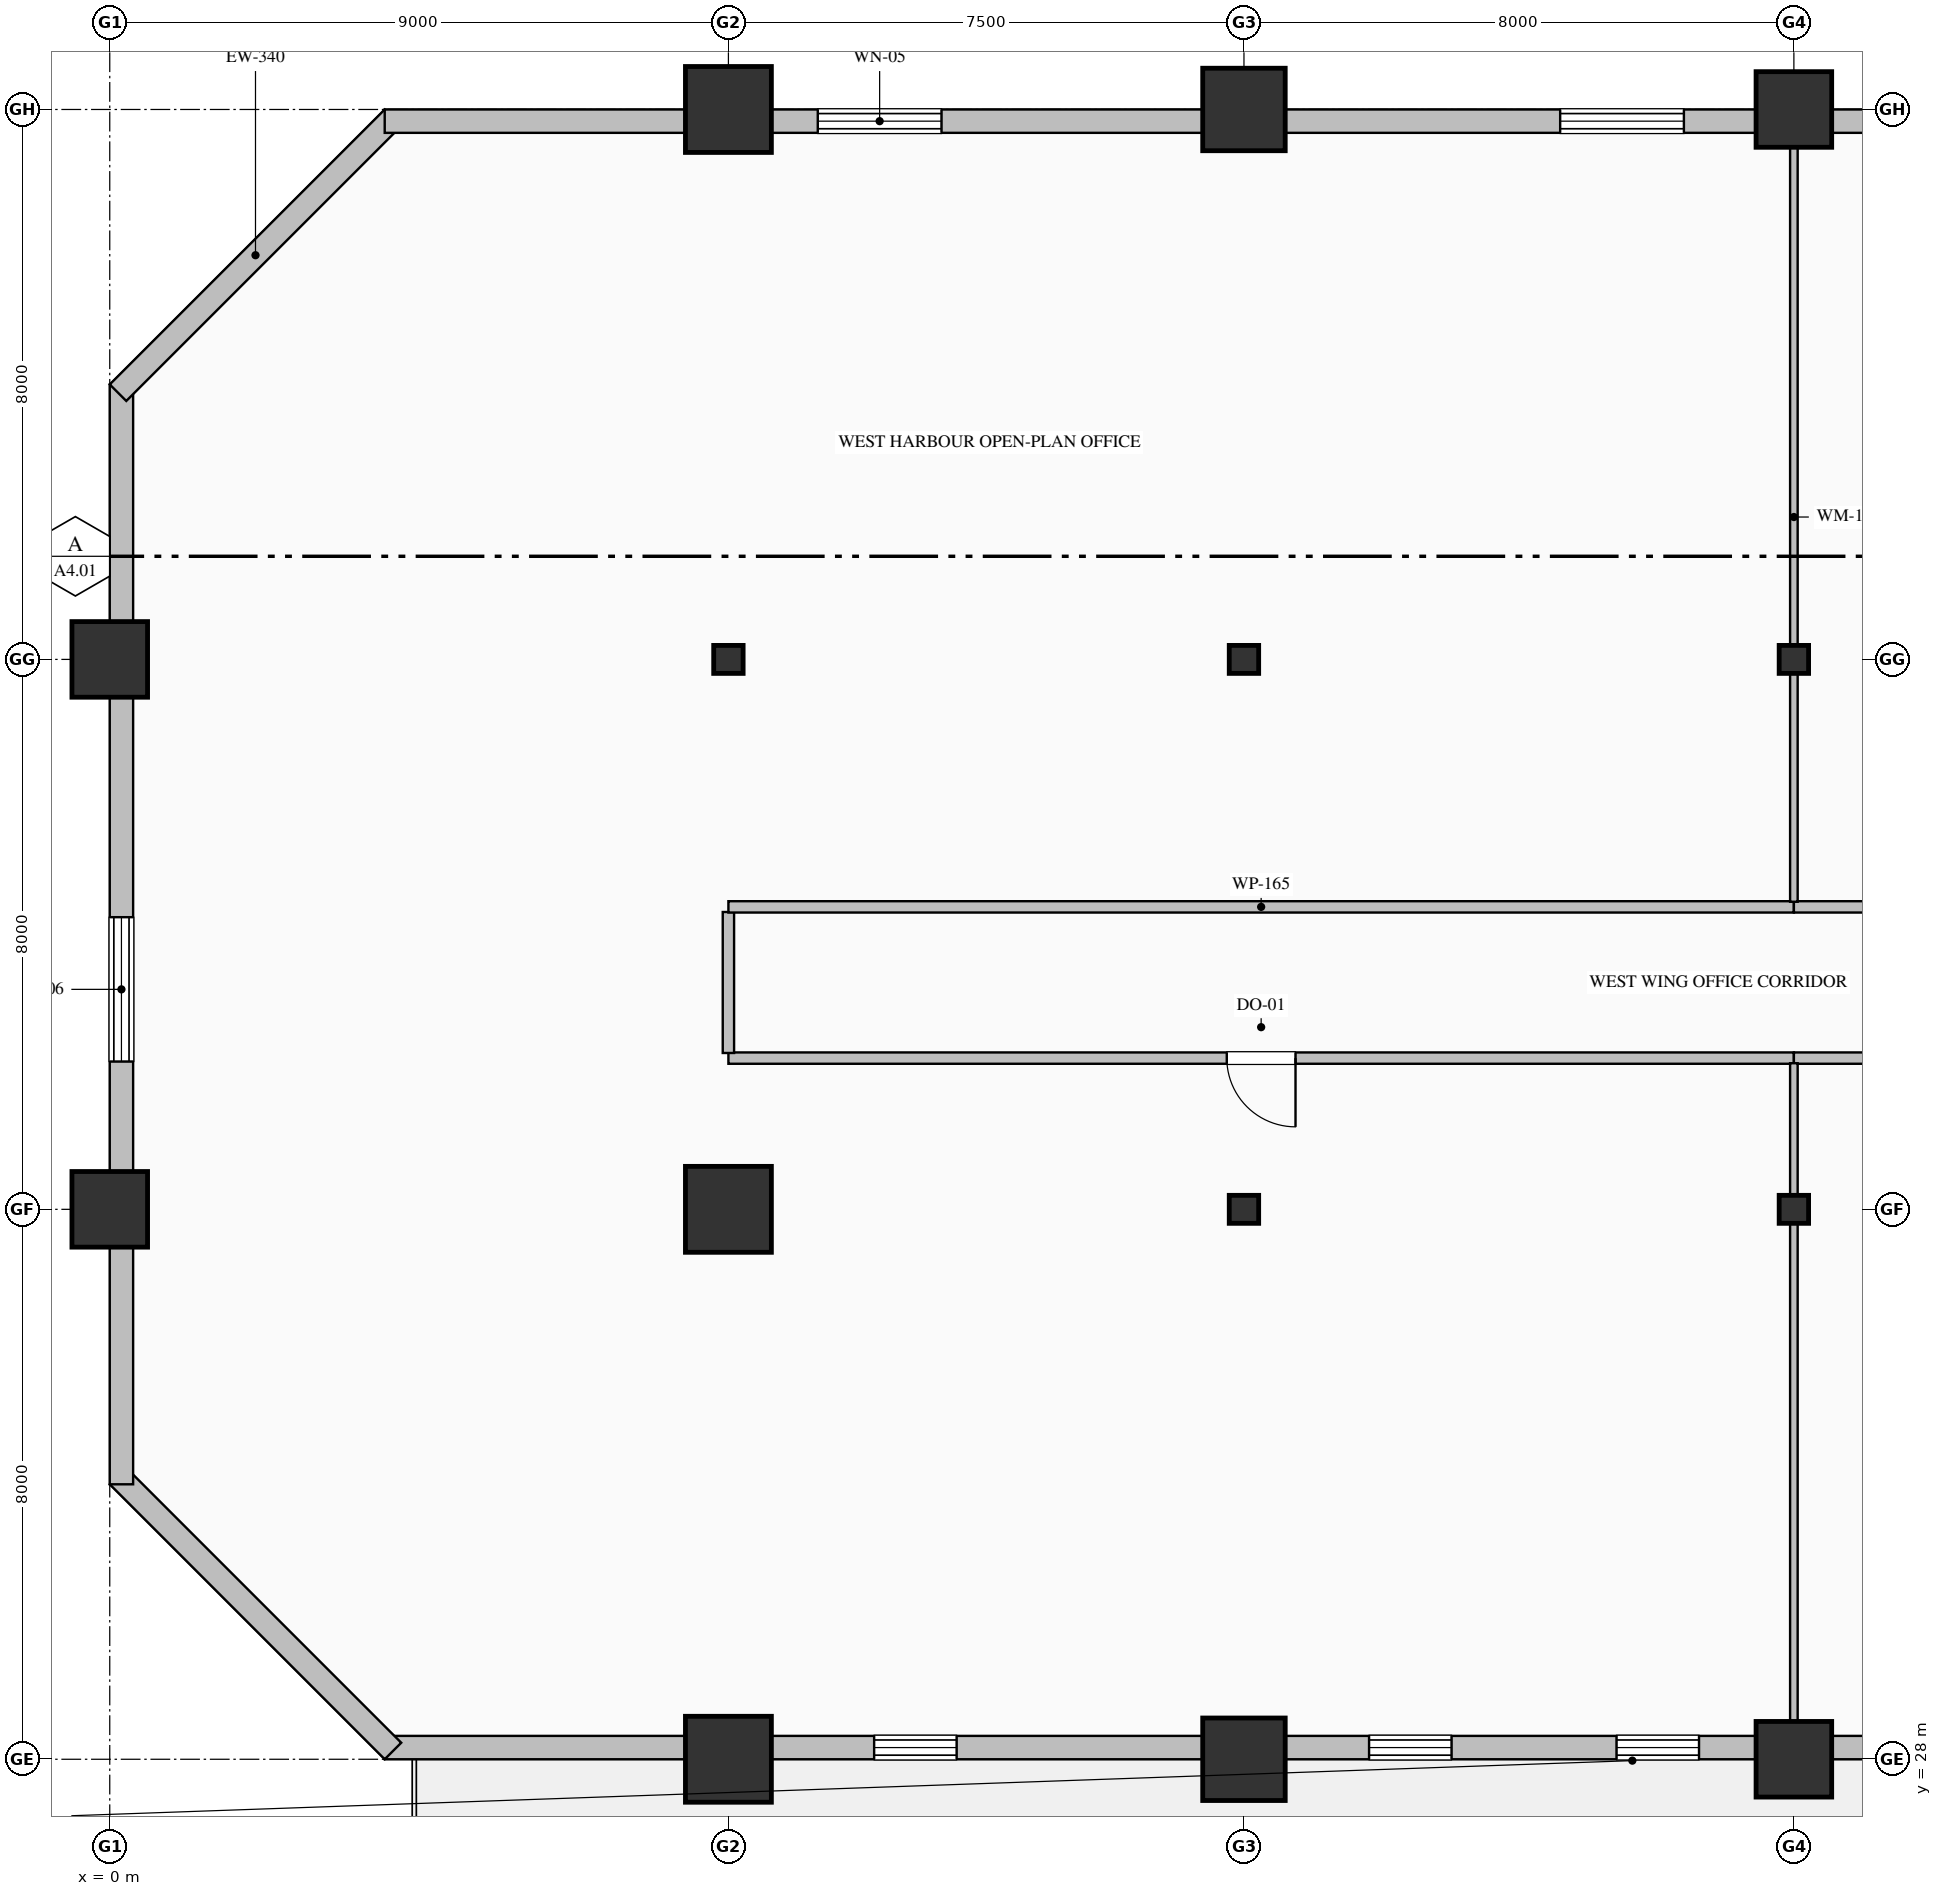
"""IFC4 building model, lengths in metres.
Left out: names, types, materials, properties, quantities, classifications, styles, units other than length and angle.
Written with IfcOpenShell. Run it as: python <this file> out.ifc"""

import sys

from ifc_helpers import new_model, si_unit, direction, frame, frame_2d, origin, origin_2d, place, context, subcontext, project, spatial, rectangle, hollow_rectangle, hollow_circle, i_section, extrude, element, fill, save


model = new_model("IFC4")
c1 = context("Model", 3, precision=1e-05, world=origin(), true_north=direction((0.0, 1.0)))
c2 = subcontext(c1, "Body", "Model", "MODEL_VIEW")
j1 = project(units=[si_unit("LENGTHUNIT", "METRE"), si_unit("PLANEANGLEUNIT", "RADIAN")], contexts=[c1])
p1 = place(None, origin())
s1 = spatial("IfcSite", under=j1, at=p1, CompositionType="ELEMENT")
p2 = place(p1, origin())
s2 = spatial("IfcBuilding", under=s1, at=p2, CompositionType="ELEMENT")
p3 = place(p2, frame((0.0, 0.0, 64.2)))
s3 = spatial("IfcBuildingStorey", under=s2, at=p3, CompositionType="ELEMENT", Elevation=64.2)
for number, where, z_axis, x_axis in (
    (1, (0.0, 36.0, 0.0), (0.0, 0.0, 1.0), (1.0, 0.0, 0.0)),
    (2, (0.0, 44.0, 0.0), (0.0, 0.0, 1.0), (1.0, 0.0, 0.0)),
):
    element("IfcColumn", number, at=place(p3, frame(where, z_axis=z_axis, x_axis=x_axis)), inside=s3, PredefinedType="COLUMN", context=c2, shape_type="SweptSolid", body=[
        extrude(hollow_rectangle(XDim=1.1, YDim=1.1, WallThickness=0.04, at=origin_2d()), origin(), (0.0, 0.0, 1.0), 4.0),
    ])
for number, where, z_axis, x_axis in (
    (3, (9.0, 28.0, 0.0), (0.0, 0.0, 1.0), (1.0, 0.0, 0.0)),
    (4, (9.0, 36.0, 0.0), (0.0, 0.0, 1.0), (1.0, 0.0, 0.0)),
):
    element("IfcColumn", number, at=place(p3, frame(where, z_axis=z_axis, x_axis=x_axis)), inside=s3, PredefinedType="COLUMN", context=c2, shape_type="SweptSolid", body=[
        extrude(hollow_rectangle(XDim=1.25, YDim=1.25, WallThickness=0.045, at=origin_2d()), origin(), (0.0, 0.0, 1.0), 4.0),
    ])
p4 = place(p3, frame((9.0, 44.0, 0.0), z_axis=(0.0, 0.0, 1.0), x_axis=(1.0, 0.0, 0.0)))
e5 = element("IfcColumn", 5, at=p4, inside=s3, PredefinedType="COLUMN", context=c2, shape_type="SweptSolid", body=[
    extrude(i_section(OverallWidth=0.407, OverallDepth=0.428, WebThickness=0.02, FlangeThickness=0.035, FilletRadius=0.022, at=origin_2d()), origin(), (0.0, 0.0, 1.0), 4.0),
])
p5 = place(p3, frame((9.0, 52.0, 0.0), z_axis=(0.0, 0.0, 1.0), x_axis=(1.0, 0.0, 0.0)))
e6 = element("IfcColumn", 6, at=p5, inside=s3, PredefinedType="COLUMN", context=c2, shape_type="SweptSolid", body=[
    extrude(hollow_rectangle(XDim=1.25, YDim=1.25, WallThickness=0.045, at=origin_2d()), origin(), (0.0, 0.0, 1.0), 4.0),
])
p6 = place(p3, frame((16.5, 28.0, 0.0), z_axis=(0.0, 0.0, 1.0), x_axis=(1.0, 0.0, 0.0)))
e7 = element("IfcColumn", 7, at=p6, inside=s3, PredefinedType="COLUMN", context=c2, shape_type="SweptSolid", body=[
    extrude(hollow_circle(Radius=0.6, WallThickness=0.04, at=origin_2d()), origin(), (0.0, 0.0, 1.0), 4.0),
])
for number, where, z_axis, x_axis in (
    (8, (16.5, 36.0, 0.0), (0.0, 0.0, 1.0), (1.0, 0.0, 0.0)),
    (9, (16.5, 44.0, 0.0), (0.0, 0.0, 1.0), (1.0, 0.0, 0.0)),
):
    element("IfcColumn", number, at=place(p3, frame(where, z_axis=z_axis, x_axis=x_axis)), inside=s3, PredefinedType="COLUMN", context=c2, shape_type="SweptSolid", body=[
        extrude(i_section(OverallWidth=0.407, OverallDepth=0.428, WebThickness=0.02, FlangeThickness=0.035, FilletRadius=0.022, at=origin_2d()), origin(), (0.0, 0.0, 1.0), 4.0),
    ])
p7 = place(p3, frame((16.5, 52.0, 0.0), z_axis=(0.0, 0.0, 1.0), x_axis=(1.0, 0.0, 0.0)))
e10 = element("IfcColumn", 10, at=p7, inside=s3, PredefinedType="COLUMN", context=c2, shape_type="SweptSolid", body=[
    extrude(hollow_circle(Radius=0.6, WallThickness=0.04, at=origin_2d()), origin(), (0.0, 0.0, 1.0), 4.0),
])
p8 = place(p3, frame((24.5, 28.0, 0.0), z_axis=(0.0, 0.0, 1.0), x_axis=(1.0, 0.0, 0.0)))
e11 = element("IfcColumn", 11, at=p8, inside=s3, PredefinedType="COLUMN", context=c2, shape_type="SweptSolid", body=[
    extrude(hollow_rectangle(XDim=1.1, YDim=1.1, WallThickness=0.04, at=origin_2d()), origin(), (0.0, 0.0, 1.0), 4.0),
])
for number, where, z_axis, x_axis in (
    (12, (24.5, 36.0, 0.0), (0.0, 0.0, 1.0), (1.0, 0.0, 0.0)),
    (13, (24.5, 44.0, 0.0), (0.0, 0.0, 1.0), (1.0, 0.0, 0.0)),
):
    element("IfcColumn", number, at=place(p3, frame(where, z_axis=z_axis, x_axis=x_axis)), inside=s3, PredefinedType="COLUMN", context=c2, shape_type="SweptSolid", body=[
        extrude(i_section(OverallWidth=0.407, OverallDepth=0.428, WebThickness=0.02, FlangeThickness=0.035, FilletRadius=0.022, at=origin_2d()), origin(), (0.0, 0.0, 1.0), 4.0),
    ])
p9 = place(p3, frame((24.5, 52.0, 0.0), z_axis=(0.0, 0.0, 1.0), x_axis=(1.0, 0.0, 0.0)))
e14 = element("IfcColumn", 14, at=p9, inside=s3, PredefinedType="COLUMN", context=c2, shape_type="SweptSolid", body=[
    extrude(hollow_rectangle(XDim=1.1, YDim=1.1, WallThickness=0.04, at=origin_2d()), origin(), (0.0, 0.0, 1.0), 4.0),
])
p10 = place(p3, frame((40.52, 28.17, 0.0), z_axis=(0.0, 0.0, 1.0), x_axis=(-1.0, 0.0, 0.0)))
e15 = element("IfcWall", 15, at=p10, inside=s3, PredefinedType="SOLIDWALL", context=c2, shape_type="SweptSolid", body=[
    extrude(rectangle(XDim=36.52, YDim=0.34, at=frame_2d((18.26, 0.0))), origin(), (0.0, 0.0, 1.0), 3.05),
])
p11 = place(p10, frame((13.8, 0.0, 0.7)))
e16 = element("IfcOpeningElement", 16, at=p11, cuts=e15, PredefinedType="OPENING", context=c2, shape_type="SweptSolid", body=[
    extrude(rectangle(XDim=1.2, YDim=1.85, at=frame_2d((0.6, 0.925))), frame((0.0, 0.18, 0.0), z_axis=(0.0, -1.0, 0.0), x_axis=(1.0, 0.0, 0.0)), (0.0, 0.0, 1.0), 0.36),
])
p12 = place(p10, frame((17.4, 0.0, 0.7)))
e17 = element("IfcOpeningElement", 17, at=p12, cuts=e15, PredefinedType="OPENING", context=c2, shape_type="SweptSolid", body=[
    extrude(rectangle(XDim=1.2, YDim=1.85, at=frame_2d((0.6, 0.925))), frame((0.0, 0.18, 0.0), z_axis=(0.0, -1.0, 0.0), x_axis=(1.0, 0.0, 0.0)), (0.0, 0.0, 1.0), 0.36),
])
p13 = place(p10, frame((21.0, 0.0, 0.7)))
e18 = element("IfcOpeningElement", 18, at=p13, cuts=e15, PredefinedType="OPENING", context=c2, shape_type="SweptSolid", body=[
    extrude(rectangle(XDim=1.2, YDim=1.85, at=frame_2d((0.6, 0.925))), frame((0.0, 0.18, 0.0), z_axis=(0.0, -1.0, 0.0), x_axis=(1.0, 0.0, 0.0)), (0.0, 0.0, 1.0), 0.36),
])
p14 = place(p10, frame((28.2, 0.0, 0.7)))
e19 = element("IfcOpeningElement", 19, at=p14, cuts=e15, PredefinedType="OPENING", context=c2, shape_type="SweptSolid", body=[
    extrude(rectangle(XDim=1.2, YDim=1.85, at=frame_2d((0.6, 0.925))), frame((0.0, 0.18, 0.0), z_axis=(0.0, -1.0, 0.0), x_axis=(1.0, 0.0, 0.0)), (0.0, 0.0, 1.0), 0.36),
])
p15 = place(p10, frame((11.395, 0.0, 0.0)))
e20 = element("IfcOpeningElement", 20, at=p15, cuts=e15, PredefinedType="OPENING", context=c2, shape_type="SweptSolid", body=[
    extrude(rectangle(XDim=1.25, YDim=2.25, at=frame_2d((0.625, 1.125))), frame((0.0, 0.18, 0.0), z_axis=(0.0, -1.0, 0.0), x_axis=(1.0, 0.0, 0.0)), (0.0, 0.0, 1.0), 0.36),
])
p16 = place(p3, frame((4.12, 28.12, 0.0), z_axis=(0.0, 0.0, 1.0), x_axis=(-0.707106781187, 0.707106781187, 0.0)))
e21 = element("IfcWall", 21, at=p16, inside=s3, PredefinedType="SOLIDWALL", context=c2, shape_type="SweptSolid", body=[
    extrude(rectangle(XDim=5.657, YDim=0.34, at=frame_2d((2.828, 0.0))), origin(), (0.0, 0.0, 1.0), 3.75),
])
p17 = place(p3, frame((0.17, 32.0, 0.0), z_axis=(0.0, 0.0, 1.0), x_axis=(0.0, 1.0, 0.0)))
e22 = element("IfcWall", 22, at=p17, inside=s3, PredefinedType="SOLIDWALL", context=c2, shape_type="SweptSolid", body=[
    extrude(rectangle(XDim=16.0, YDim=0.34, at=frame_2d((8.0, 0.0))), origin(), (0.0, 0.0, 1.0), 3.25),
])
p18 = place(p17, frame((6.15, 0.0, 0.85)))
e23 = element("IfcOpeningElement", 23, at=p18, cuts=e22, PredefinedType="OPENING", context=c2, shape_type="SweptSolid", body=[
    extrude(rectangle(XDim=2.1, YDim=2.05, at=frame_2d((1.05, 1.025))), frame((0.0, 0.18, 0.0), z_axis=(0.0, -1.0, 0.0), x_axis=(1.0, 0.0, 0.0)), (0.0, 0.0, 1.0), 0.36),
])
p19 = place(p3, frame((0.12, 47.88, 0.0), z_axis=(0.0, 0.0, 1.0), x_axis=(0.707106781187, 0.707106781187, 0.0)))
e24 = element("IfcWall", 24, at=p19, inside=s3, PredefinedType="SOLIDWALL", context=c2, shape_type="SweptSolid", body=[
    extrude(rectangle(XDim=5.657, YDim=0.34, at=frame_2d((2.828, 0.0))), origin(), (0.0, 0.0, 1.0), 3.75),
])
p20 = place(p3, frame((4.0, 51.83, 0.0), z_axis=(0.0, 0.0, 1.0), x_axis=(1.0, 0.0, 0.0)))
e25 = element("IfcWall", 25, at=p20, inside=s3, PredefinedType="SOLIDWALL", context=c2, shape_type="SweptSolid", body=[
    extrude(rectangle(XDim=36.52, YDim=0.34, at=frame_2d((18.26, 0.0))), origin(), (0.0, 0.0, 1.0), 3.25),
])
p21 = place(p20, frame((6.3, 0.0, 0.85)))
e26 = element("IfcOpeningElement", 26, at=p21, cuts=e25, PredefinedType="OPENING", context=c2, shape_type="SweptSolid", body=[
    extrude(rectangle(XDim=1.8, YDim=2.05, at=frame_2d((0.9, 1.025))), frame((0.0, 0.18, 0.0), z_axis=(0.0, -1.0, 0.0), x_axis=(1.0, 0.0, 0.0)), (0.0, 0.0, 1.0), 0.36),
])
p22 = place(p20, frame((17.1, 0.0, 0.85)))
e27 = element("IfcOpeningElement", 27, at=p22, cuts=e25, PredefinedType="OPENING", context=c2, shape_type="SweptSolid", body=[
    extrude(rectangle(XDim=1.8, YDim=2.05, at=frame_2d((0.9, 1.025))), frame((0.0, 0.18, 0.0), z_axis=(0.0, -1.0, 0.0), x_axis=(1.0, 0.0, 0.0)), (0.0, 0.0, 1.0), 0.36),
])
p23 = place(p20, frame((24.0, 0.0, 0.8)))
e28 = element("IfcOpeningElement", 28, at=p23, cuts=e25, PredefinedType="OPENING", context=c2, shape_type="SweptSolid", body=[
    extrude(rectangle(XDim=2.4, YDim=2.15, at=frame_2d((1.2, 1.075))), frame((0.0, 0.18, 0.0), z_axis=(0.0, -1.0, 0.0), x_axis=(1.0, 0.0, 0.0)), (0.0, 0.0, 1.0), 0.36),
])
p24 = place(p3, frame((24.5, 38.2, 0.0), z_axis=(0.0, 0.0, 1.0), x_axis=(-1.0, 0.0, 0.0)))
e29 = element("IfcWall", 29, at=p24, inside=s3, PredefinedType="PARTITIONING", context=c2, shape_type="SweptSolid", body=[
    extrude(rectangle(XDim=15.5, YDim=0.165, at=frame_2d((7.75, 0.0))), origin(), (0.0, 0.0, 1.0), 3.75),
])
p25 = place(p24, frame((7.25, 0.0, 0.0)))
e30 = element("IfcOpeningElement", 30, at=p25, cuts=e29, PredefinedType="OPENING", context=c2, shape_type="SweptSolid", body=[
    extrude(rectangle(XDim=1.0, YDim=2.15, at=frame_2d((0.5, 1.075))), frame((0.0, 0.093, 0.0), z_axis=(0.0, -1.0, 0.0), x_axis=(1.0, 0.0, 0.0)), (0.0, 0.0, 1.0), 0.185),
])
p26 = place(p3, frame((9.0, 38.274, 0.0), z_axis=(0.0, 0.0, 1.0), x_axis=(0.0, 1.0, 0.0)))
e31 = element("IfcWall", 31, at=p26, inside=s3, PredefinedType="PARTITIONING", context=c2, shape_type="SweptSolid", body=[
    extrude(rectangle(XDim=2.051, YDim=0.165, at=frame_2d((1.025, 0.0))), origin(), (0.0, 0.0, 1.0), 3.042),
])
p27 = place(p3, frame((9.0, 40.4, 0.0), z_axis=(0.0, 0.0, 1.0), x_axis=(1.0, 0.0, 0.0)))
e32 = element("IfcWall", 32, at=p27, inside=s3, PredefinedType="PARTITIONING", context=c2, shape_type="SweptSolid", body=[
    extrude(rectangle(XDim=15.5, YDim=0.165, at=frame_2d((7.75, 0.0))), origin(), (0.0, 0.0, 1.0), 3.75),
])
p28 = place(p3, frame((24.5, 40.4, 0.0), z_axis=(0.0, 0.0, 1.0), x_axis=(1.0, 0.0, 0.0)))
e33 = element("IfcWall", 33, at=p28, inside=s3, PredefinedType="PARTITIONING", context=c2, shape_type="SweptSolid", body=[
    extrude(rectangle(XDim=13.3, YDim=0.165, at=frame_2d((6.65, 0.0))), origin(), (0.0, 0.0, 1.0), 3.75),
])
p29 = place(p28, frame((6.2, 0.0, 0.0)))
e34 = element("IfcOpeningElement", 34, at=p29, cuts=e33, PredefinedType="OPENING", context=c2, shape_type="SweptSolid", body=[
    extrude(rectangle(XDim=0.9, YDim=2.15, at=frame_2d((0.45, 1.075))), frame((0.0, 0.093, 0.0), z_axis=(0.0, -1.0, 0.0), x_axis=(1.0, 0.0, 0.0)), (0.0, 0.0, 1.0), 0.185),
])
p30 = place(p3, frame((31.0, 38.2, 0.0), z_axis=(0.0, 0.0, 1.0), x_axis=(-1.0, 0.0, 0.0)))
e35 = element("IfcWall", 35, at=p30, inside=s3, PredefinedType="PARTITIONING", context=c2, shape_type="SweptSolid", body=[
    extrude(rectangle(XDim=6.5, YDim=0.165, at=frame_2d((3.25, 0.0))), origin(), (0.0, 0.0, 1.0), 3.75),
])
p31 = place(p30, frame((2.75, 0.0, 0.0)))
e36 = element("IfcOpeningElement", 36, at=p31, cuts=e35, PredefinedType="OPENING", context=c2, shape_type="SweptSolid", body=[
    extrude(rectangle(XDim=1.0, YDim=2.15, at=frame_2d((0.5, 1.075))), frame((0.0, 0.093, 0.0), z_axis=(0.0, -1.0, 0.0), x_axis=(1.0, 0.0, 0.0)), (0.0, 0.0, 1.0), 0.185),
])
p32 = place(p3, frame((24.5, 51.668, 0.0), z_axis=(0.0, 0.0, 1.0), x_axis=(0.0, -1.0, 0.0)))
e37 = element("IfcWall", 37, at=p32, inside=s3, PredefinedType="MOVABLE", context=c2, shape_type="SweptSolid", body=[
    extrude(rectangle(XDim=11.193, YDim=0.11, at=frame_2d((5.597, 0.0))), origin(), (0.0, 0.0, 1.0), 3.042),
])
p33 = place(p3, frame((24.5, 38.125, 0.0), z_axis=(0.0, 0.0, 1.0), x_axis=(0.0, -1.0, 0.0)))
e38 = element("IfcWall", 38, at=p33, inside=s3, PredefinedType="MOVABLE", context=c2, shape_type="SweptSolid", body=[
    extrude(rectangle(XDim=9.793, YDim=0.11, at=frame_2d((4.897, 0.0))), origin(), (0.0, 0.0, 1.0), 3.042),
])
p34 = place(p12, origin())
e39 = element("IfcWindow", 39, at=p34, inside=s3, PartitioningType="DOUBLE_PANEL_VERTICAL", PredefinedType="WINDOW", context=c2, shape_type="SweptSolid", body=[
    extrude(rectangle(XDim=1.2, YDim=1.85, at=frame_2d((0.6, 0.925))), frame((0.0, 0.15, 0.0), z_axis=(0.0, -1.0, 0.0), x_axis=(1.0, 0.0, 0.0)), (0.0, 0.0, 1.0), 0.06),
])
fill(e17, e39)
p35 = place(p13, origin())
e40 = element("IfcWindow", 40, at=p35, inside=s3, PartitioningType="DOUBLE_PANEL_VERTICAL", PredefinedType="WINDOW", context=c2, shape_type="SweptSolid", body=[
    extrude(rectangle(XDim=1.2, YDim=1.85, at=frame_2d((0.6, 0.925))), frame((0.0, 0.15, 0.0), z_axis=(0.0, -1.0, 0.0), x_axis=(1.0, 0.0, 0.0)), (0.0, 0.0, 1.0), 0.06),
])
fill(e18, e40)
p36 = place(p14, origin())
e41 = element("IfcWindow", 41, at=p36, inside=s3, PartitioningType="DOUBLE_PANEL_VERTICAL", PredefinedType="WINDOW", context=c2, shape_type="SweptSolid", body=[
    extrude(rectangle(XDim=1.2, YDim=1.85, at=frame_2d((0.6, 0.925))), frame((0.0, 0.15, 0.0), z_axis=(0.0, -1.0, 0.0), x_axis=(1.0, 0.0, 0.0)), (0.0, 0.0, 1.0), 0.06),
])
fill(e19, e41)
p37 = place(p18, origin())
e42 = element("IfcWindow", 42, at=p37, inside=s3, PartitioningType="TRIPLE_PANEL_VERTICAL", PredefinedType="WINDOW", context=c2, shape_type="SweptSolid", body=[
    extrude(rectangle(XDim=2.1, YDim=2.05, at=frame_2d((1.05, 1.025))), frame((0.0, 0.15, 0.0), z_axis=(0.0, -1.0, 0.0), x_axis=(1.0, 0.0, 0.0)), (0.0, 0.0, 1.0), 0.06),
])
fill(e23, e42)
p38 = place(p21, origin())
e43 = element("IfcWindow", 43, at=p38, inside=s3, PartitioningType="TRIPLE_PANEL_VERTICAL", PredefinedType="WINDOW", context=c2, shape_type="SweptSolid", body=[
    extrude(rectangle(XDim=1.8, YDim=2.05, at=frame_2d((0.9, 1.025))), frame((0.0, 0.15, 0.0), z_axis=(0.0, -1.0, 0.0), x_axis=(1.0, 0.0, 0.0)), (0.0, 0.0, 1.0), 0.06),
])
fill(e26, e43)
p39 = place(p22, origin())
e44 = element("IfcWindow", 44, at=p39, inside=s3, PartitioningType="TRIPLE_PANEL_VERTICAL", PredefinedType="WINDOW", context=c2, shape_type="SweptSolid", body=[
    extrude(rectangle(XDim=1.8, YDim=2.05, at=frame_2d((0.9, 1.025))), frame((0.0, 0.15, 0.0), z_axis=(0.0, -1.0, 0.0), x_axis=(1.0, 0.0, 0.0)), (0.0, 0.0, 1.0), 0.06),
])
fill(e27, e44)
p40 = place(p25, origin())
e45 = element("IfcDoor", 45, at=p40, inside=s3, OperationType="SINGLE_SWING_LEFT", PredefinedType="DOOR", context=c2, shape_type="SweptSolid", body=[
    extrude(rectangle(XDim=1.0, YDim=2.15, at=frame_2d((0.5, 1.075))), frame((0.0, 0.025, 0.0), z_axis=(0.0, -1.0, 0.0), x_axis=(1.0, 0.0, 0.0)), (0.0, 0.0, 1.0), 0.05),
])
fill(e30, e45)
save(model, sys.argv[1])
